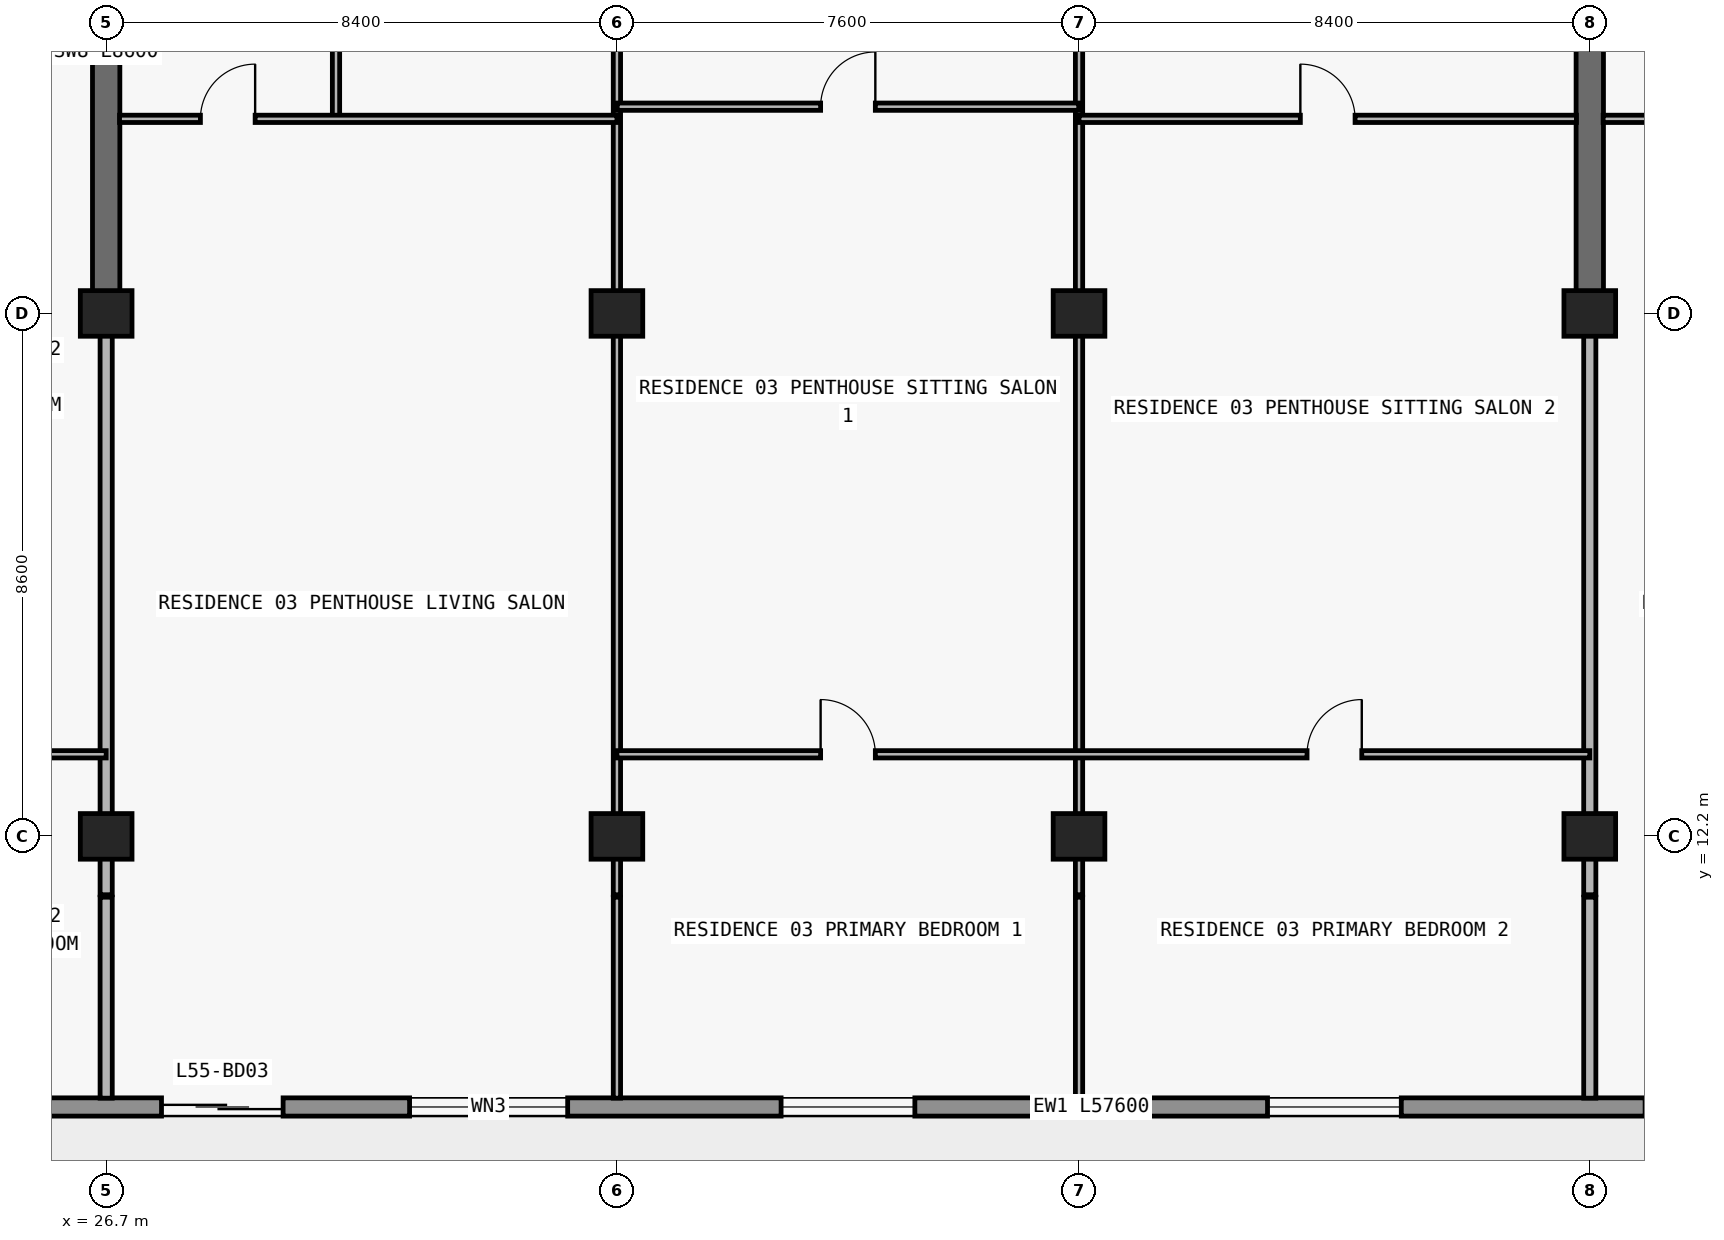
"""IFC4 building model, lengths in metres.
Left out: names, types, materials, properties, quantities, classifications, styles, units other than length and angle.
Written with IfcOpenShell. Run it as: python <this file> out.ifc"""

import sys

from ifc_helpers import new_model, si_unit, direction, frame, frame_2d, origin, origin_2d, place, context, subcontext, project, spatial, rectangle, extrude, element, fill, save


model = new_model("IFC4")
c1 = context("Model", 3, precision=1e-05, world=origin(), true_north=direction((0.0, 1.0)))
c2 = subcontext(c1, "Body", "Model", "MODEL_VIEW")
j1 = project(units=[si_unit("LENGTHUNIT", "METRE"), si_unit("PLANEANGLEUNIT", "RADIAN")], contexts=[c1])
p1 = place(None, origin())
s1 = spatial("IfcSite", under=j1, at=p1, CompositionType="ELEMENT")
p2 = place(p1, origin())
s2 = spatial("IfcBuilding", under=s1, at=p2, CompositionType="ELEMENT")
p3 = place(p2, frame((0.0, 0.0, 198.3)))
s3 = spatial("IfcBuildingStorey", under=s2, at=p3, CompositionType="ELEMENT", Elevation=198.3)
for number, where, z_axis, x_axis in (
    (1, (26.7, 12.2, 0.0), (0.0, 0.0, 1.0), (1.0, 0.0, 0.0)),
    (2, (35.1, 12.2, 0.0), (0.0, 0.0, 1.0), (1.0, 0.0, 0.0)),
    (3, (42.7, 12.2, 0.0), (0.0, 0.0, 1.0), (1.0, 0.0, 0.0)),
    (4, (51.1, 12.2, 0.0), (0.0, 0.0, 1.0), (1.0, 0.0, 0.0)),
    (5, (26.7, 20.8, 0.0), (0.0, 0.0, 1.0), (1.0, 0.0, 0.0)),
    (6, (35.1, 20.8, 0.0), (0.0, 0.0, 1.0), (1.0, 0.0, 0.0)),
    (7, (42.7, 20.8, 0.0), (0.0, 0.0, 1.0), (1.0, 0.0, 0.0)),
    (8, (51.1, 20.8, 0.0), (0.0, 0.0, 1.0), (1.0, 0.0, 0.0)),
):
    element("IfcColumn", number, at=place(p3, frame(where, z_axis=z_axis, x_axis=x_axis)), inside=s3, PredefinedType="COLUMN", context=c2, shape_type="SweptSolid", body=[
        extrude(rectangle(XDim=0.85, YDim=0.75, at=origin_2d()), origin(), (0.0, 0.0, 1.0), 3.05),
    ])
for number, where, z_axis, x_axis in (
    (9, (26.7, 20.8, 0.0), (0.0, 0.0, 1.0), (0.0, 1.0, 0.0)),
    (10, (51.1, 20.8, 0.0), (0.0, 0.0, 1.0), (0.0, 1.0, 0.0)),
):
    element("IfcWall", number, at=place(p3, frame(where, z_axis=z_axis, x_axis=x_axis)), inside=s3, PredefinedType="SHEAR", context=c2, shape_type="SweptSolid", body=[
        extrude(rectangle(XDim=8.6, YDim=0.45, at=frame_2d((4.3, 0.0))), origin(), (0.0, 0.0, 1.0), 3.05),
    ])
p4 = place(p3, frame((67.7, 7.75, 0.0), z_axis=(0.0, 0.0, 1.0), x_axis=(-1.0, 0.0, 0.0)))
e11 = element("IfcWall", 11, at=p4, inside=s3, PredefinedType="STANDARD", context=c2, shape_type="SweptSolid", body=[
    extrude(rectangle(XDim=57.6, YDim=0.3, at=frame_2d((28.8, 0.0))), origin(), (0.0, 0.0, 1.0), 3.05),
])
p5 = place(p4, frame((54.673, 0.0, 0.0)))
e12 = element("IfcOpeningElement", 12, at=p5, cuts=e11, PredefinedType="OPENING", context=c2, shape_type="SweptSolid", body=[
    extrude(rectangle(XDim=2.0, YDim=2.3, at=frame_2d((1.0, 1.15))), frame((0.0, 0.16, 0.0), z_axis=(0.0, -1.0, 0.0), x_axis=(1.0, 0.0, 0.0)), (0.0, 0.0, 1.0), 0.32),
])
p6 = place(p4, frame((50.473, 0.0, 0.85)))
e13 = element("IfcOpeningElement", 13, at=p6, cuts=e11, PredefinedType="OPENING", context=c2, shape_type="SweptSolid", body=[
    extrude(rectangle(XDim=2.2, YDim=1.55, at=frame_2d((1.1, 0.775))), frame((0.0, 0.16, 0.0), z_axis=(0.0, -1.0, 0.0), x_axis=(1.0, 0.0, 0.0)), (0.0, 0.0, 1.0), 0.32),
])
p7 = place(p4, frame((46.09, 0.0, 0.0)))
e14 = element("IfcOpeningElement", 14, at=p7, cuts=e11, PredefinedType="OPENING", context=c2, shape_type="SweptSolid", body=[
    extrude(rectangle(XDim=2.0, YDim=2.3, at=frame_2d((1.0, 1.15))), frame((0.0, 0.16, 0.0), z_axis=(0.0, -1.0, 0.0), x_axis=(1.0, 0.0, 0.0)), (0.0, 0.0, 1.0), 0.32),
])
p8 = place(p4, frame((41.99, 0.0, 0.85)))
e15 = element("IfcOpeningElement", 15, at=p8, cuts=e11, PredefinedType="OPENING", context=c2, shape_type="SweptSolid", body=[
    extrude(rectangle(XDim=1.8, YDim=1.55, at=frame_2d((0.9, 0.775))), frame((0.0, 0.16, 0.0), z_axis=(0.0, -1.0, 0.0), x_axis=(1.0, 0.0, 0.0)), (0.0, 0.0, 1.0), 0.32),
])
p9 = place(p4, frame((38.09, 0.0, 0.0)))
e16 = element("IfcOpeningElement", 16, at=p9, cuts=e11, PredefinedType="OPENING", context=c2, shape_type="SweptSolid", body=[
    extrude(rectangle(XDim=2.0, YDim=2.3, at=frame_2d((1.0, 1.15))), frame((0.0, 0.16, 0.0), z_axis=(0.0, -1.0, 0.0), x_axis=(1.0, 0.0, 0.0)), (0.0, 0.0, 1.0), 0.32),
])
p10 = place(p4, frame((33.41, 0.0, 0.65)))
e17 = element("IfcOpeningElement", 17, at=p10, cuts=e11, PredefinedType="OPENING", context=c2, shape_type="SweptSolid", body=[
    extrude(rectangle(XDim=2.6, YDim=1.85, at=frame_2d((1.3, 0.925))), frame((0.0, 0.16, 0.0), z_axis=(0.0, -1.0, 0.0), x_axis=(1.0, 0.0, 0.0)), (0.0, 0.0, 1.0), 0.32),
])
p11 = place(p4, frame((27.7, 0.0, 0.85)))
e18 = element("IfcOpeningElement", 18, at=p11, cuts=e11, PredefinedType="OPENING", context=c2, shape_type="SweptSolid", body=[
    extrude(rectangle(XDim=2.2, YDim=1.55, at=frame_2d((1.1, 0.775))), frame((0.0, 0.16, 0.0), z_axis=(0.0, -1.0, 0.0), x_axis=(1.0, 0.0, 0.0)), (0.0, 0.0, 1.0), 0.32),
])
p12 = place(p4, frame((19.7, 0.0, 0.85)))
e19 = element("IfcOpeningElement", 19, at=p12, cuts=e11, PredefinedType="OPENING", context=c2, shape_type="SweptSolid", body=[
    extrude(rectangle(XDim=2.2, YDim=1.55, at=frame_2d((1.1, 0.775))), frame((0.0, 0.16, 0.0), z_axis=(0.0, -1.0, 0.0), x_axis=(1.0, 0.0, 0.0)), (0.0, 0.0, 1.0), 0.32),
])
p13 = place(p4, frame((13.69, 0.0, 0.0)))
e20 = element("IfcOpeningElement", 20, at=p13, cuts=e11, PredefinedType="OPENING", context=c2, shape_type="SweptSolid", body=[
    extrude(rectangle(XDim=2.0, YDim=2.3, at=frame_2d((1.0, 1.15))), frame((0.0, 0.16, 0.0), z_axis=(0.0, -1.0, 0.0), x_axis=(1.0, 0.0, 0.0)), (0.0, 0.0, 1.0), 0.32),
])
p14 = place(p4, frame((9.01, 0.0, 0.65)))
e21 = element("IfcOpeningElement", 21, at=p14, cuts=e11, PredefinedType="OPENING", context=c2, shape_type="SweptSolid", body=[
    extrude(rectangle(XDim=2.6, YDim=1.85, at=frame_2d((1.3, 0.925))), frame((0.0, 0.16, 0.0), z_axis=(0.0, -1.0, 0.0), x_axis=(1.0, 0.0, 0.0)), (0.0, 0.0, 1.0), 0.32),
])
p15 = place(p4, frame((3.0, 0.0, 0.85)))
e22 = element("IfcOpeningElement", 22, at=p15, cuts=e11, PredefinedType="OPENING", context=c2, shape_type="SweptSolid", body=[
    extrude(rectangle(XDim=2.2, YDim=1.55, at=frame_2d((1.1, 0.775))), frame((0.0, 0.16, 0.0), z_axis=(0.0, -1.0, 0.0), x_axis=(1.0, 0.0, 0.0)), (0.0, 0.0, 1.0), 0.32),
])
p16 = place(p3, frame((26.7, 7.895, 0.0), z_axis=(0.0, 0.0, 1.0), x_axis=(0.0, 1.0, 0.0)))
e23 = element("IfcWall", 23, at=p16, inside=s3, PredefinedType="PARTITIONING", context=c2, shape_type="SweptSolid", body=[
    extrude(rectangle(XDim=3.305, YDim=0.2, at=frame_2d((1.652, 0.0))), origin(), (0.0, 0.0, 1.0), 3.05),
])
p17 = place(p3, frame((26.7, 11.24, 0.0), z_axis=(0.0, 0.0, 1.0), x_axis=(0.0, 1.0, 0.0)))
e24 = element("IfcWall", 24, at=p17, inside=s3, PredefinedType="PARTITIONING", context=c2, shape_type="SweptSolid", body=[
    extrude(rectangle(XDim=9.555, YDim=0.2, at=frame_2d((4.777, 0.0))), origin(), (0.0, 0.0, 1.0), 2.263),
])
p18 = place(p3, frame((30.48, 24.0, 0.0), z_axis=(0.0, 0.0, 1.0), x_axis=(0.0, 1.0, 0.0)))
e25 = element("IfcWall", 25, at=p18, inside=s3, PredefinedType="PARTITIONING", context=c2, shape_type="SweptSolid", body=[
    extrude(rectangle(XDim=4.8, YDim=0.12, at=frame_2d((2.4, 0.0))), origin(), (0.0, 0.0, 1.0), 3.05),
])
p19 = place(p18, frame((1.95, 0.0, 0.0)))
e26 = element("IfcOpeningElement", 26, at=p19, cuts=e25, PredefinedType="OPENING", context=c2, shape_type="SweptSolid", body=[
    extrude(rectangle(XDim=0.9, YDim=2.15, at=frame_2d((0.45, 1.075))), frame((0.0, 0.07, 0.0), z_axis=(0.0, -1.0, 0.0), x_axis=(1.0, 0.0, 0.0)), (0.0, 0.0, 1.0), 0.14),
])
p20 = place(p3, frame((35.1, 7.895, 0.0), z_axis=(0.0, 0.0, 1.0), x_axis=(0.0, 1.0, 0.0)))
e27 = element("IfcWall", 27, at=p20, inside=s3, PredefinedType="PARTITIONING", context=c2, shape_type="SweptSolid", body=[
    extrude(rectangle(XDim=3.305, YDim=0.12, at=frame_2d((1.652, 0.0))), origin(), (0.0, 0.0, 1.0), 3.05),
])
p21 = place(p3, frame((35.1, 11.24, 0.0), z_axis=(0.0, 0.0, 1.0), x_axis=(0.0, 1.0, 0.0)))
e28 = element("IfcWall", 28, at=p21, inside=s3, PredefinedType="PARTITIONING", context=c2, shape_type="SweptSolid", body=[
    extrude(rectangle(XDim=23.46, YDim=0.12, at=frame_2d((11.73, 0.0))), origin(), (0.0, 0.0, 1.0), 2.263),
])
p22 = place(p21, frame((14.71, 0.0, 0.0)))
e29 = element("IfcOpeningElement", 29, at=p22, cuts=e28, PredefinedType="OPENING", context=c2, shape_type="SweptSolid", body=[
    extrude(rectangle(XDim=0.9, YDim=2.15, at=frame_2d((0.45, 1.075))), frame((0.0, 0.07, 0.0), z_axis=(0.0, -1.0, 0.0), x_axis=(1.0, 0.0, 0.0)), (0.0, 0.0, 1.0), 0.14),
])
p23 = place(p3, frame((42.7, 7.895, 0.0), z_axis=(0.0, 0.0, 1.0), x_axis=(0.0, 1.0, 0.0)))
e30 = element("IfcWall", 30, at=p23, inside=s3, PredefinedType="PARTITIONING", context=c2, shape_type="SweptSolid", body=[
    extrude(rectangle(XDim=3.305, YDim=0.12, at=frame_2d((1.652, 0.0))), origin(), (0.0, 0.0, 1.0), 3.05),
])
p24 = place(p3, frame((42.7, 11.24, 0.0), z_axis=(0.0, 0.0, 1.0), x_axis=(0.0, 1.0, 0.0)))
e31 = element("IfcWall", 31, at=p24, inside=s3, PredefinedType="PARTITIONING", context=c2, shape_type="SweptSolid", body=[
    extrude(rectangle(XDim=23.46, YDim=0.12, at=frame_2d((11.73, 0.0))), origin(), (0.0, 0.0, 1.0), 2.263),
])
p25 = place(p24, frame((14.71, 0.0, 0.0)))
e32 = element("IfcOpeningElement", 32, at=p25, cuts=e31, PredefinedType="OPENING", context=c2, shape_type="SweptSolid", body=[
    extrude(rectangle(XDim=0.9, YDim=2.15, at=frame_2d((0.45, 1.075))), frame((0.0, 0.07, 0.0), z_axis=(0.0, -1.0, 0.0), x_axis=(1.0, 0.0, 0.0)), (0.0, 0.0, 1.0), 0.14),
])
p26 = place(p3, frame((51.1, 7.895, 0.0), z_axis=(0.0, 0.0, 1.0), x_axis=(0.0, 1.0, 0.0)))
e33 = element("IfcWall", 33, at=p26, inside=s3, PredefinedType="PARTITIONING", context=c2, shape_type="SweptSolid", body=[
    extrude(rectangle(XDim=3.305, YDim=0.2, at=frame_2d((1.652, 0.0))), origin(), (0.0, 0.0, 1.0), 3.05),
])
p27 = place(p3, frame((51.1, 11.24, 0.0), z_axis=(0.0, 0.0, 1.0), x_axis=(0.0, 1.0, 0.0)))
e34 = element("IfcWall", 34, at=p27, inside=s3, PredefinedType="PARTITIONING", context=c2, shape_type="SweptSolid", body=[
    extrude(rectangle(XDim=9.555, YDim=0.2, at=frame_2d((4.777, 0.0))), origin(), (0.0, 0.0, 1.0), 2.263),
])
p28 = place(p3, frame((22.92, 13.55, 0.0), z_axis=(0.0, 0.0, 1.0), x_axis=(1.0, 0.0, 0.0)))
e35 = element("IfcWall", 35, at=p28, inside=s3, PredefinedType="PARTITIONING", context=c2, shape_type="SweptSolid", body=[
    extrude(rectangle(XDim=3.78, YDim=0.12, at=frame_2d((1.89, 0.0))), origin(), (0.0, 0.0, 1.0), 3.05),
])
p29 = place(p28, frame((1.44, 0.0, 0.0)))
e36 = element("IfcOpeningElement", 36, at=p29, cuts=e35, PredefinedType="OPENING", context=c2, shape_type="SweptSolid", body=[
    extrude(rectangle(XDim=0.9, YDim=2.15, at=frame_2d((0.45, 1.075))), frame((0.0, 0.07, 0.0), z_axis=(0.0, -1.0, 0.0), x_axis=(1.0, 0.0, 0.0)), (0.0, 0.0, 1.0), 0.14),
])
p30 = place(p3, frame((35.1, 13.55, 0.0), z_axis=(0.0, 0.0, 1.0), x_axis=(1.0, 0.0, 0.0)))
e37 = element("IfcWall", 37, at=p30, inside=s3, PredefinedType="PARTITIONING", context=c2, shape_type="SweptSolid", body=[
    extrude(rectangle(XDim=16.0, YDim=0.12, at=frame_2d((8.0, 0.0))), origin(), (0.0, 0.0, 1.0), 3.05),
])
p31 = place(p30, frame((3.35, 0.0, 0.0)))
e38 = element("IfcOpeningElement", 38, at=p31, cuts=e37, PredefinedType="OPENING", context=c2, shape_type="SweptSolid", body=[
    extrude(rectangle(XDim=0.9, YDim=2.15, at=frame_2d((0.45, 1.075))), frame((0.0, 0.07, 0.0), z_axis=(0.0, -1.0, 0.0), x_axis=(1.0, 0.0, 0.0)), (0.0, 0.0, 1.0), 0.14),
])
p32 = place(p30, frame((11.35, 0.0, 0.0)))
e39 = element("IfcOpeningElement", 39, at=p32, cuts=e37, PredefinedType="OPENING", context=c2, shape_type="SweptSolid", body=[
    extrude(rectangle(XDim=0.9, YDim=2.15, at=frame_2d((0.45, 1.075))), frame((0.0, 0.07, 0.0), z_axis=(0.0, -1.0, 0.0), x_axis=(1.0, 0.0, 0.0)), (0.0, 0.0, 1.0), 0.14),
])
p33 = place(p3, frame((26.92, 24.0, 0.0), z_axis=(0.0, 0.0, 1.0), x_axis=(1.0, 0.0, 0.0)))
e40 = element("IfcWall", 40, at=p33, inside=s3, PredefinedType="PARTITIONING", context=c2, shape_type="SweptSolid", body=[
    extrude(rectangle(XDim=8.18, YDim=0.12, at=frame_2d((4.09, 0.0))), origin(), (0.0, 0.0, 1.0), 3.05),
])
p34 = place(p33, frame((1.33, 0.0, 0.0)))
e41 = element("IfcOpeningElement", 41, at=p34, cuts=e40, PredefinedType="OPENING", context=c2, shape_type="SweptSolid", body=[
    extrude(rectangle(XDim=0.9, YDim=2.15, at=frame_2d((0.45, 1.075))), frame((0.0, 0.07, 0.0), z_axis=(0.0, -1.0, 0.0), x_axis=(1.0, 0.0, 0.0)), (0.0, 0.0, 1.0), 0.14),
])
p35 = place(p3, frame((42.7, 24.0, 0.0), z_axis=(0.0, 0.0, 1.0), x_axis=(1.0, 0.0, 0.0)))
e42 = element("IfcWall", 42, at=p35, inside=s3, PredefinedType="PARTITIONING", context=c2, shape_type="SweptSolid", body=[
    extrude(rectangle(XDim=8.18, YDim=0.12, at=frame_2d((4.09, 0.0))), origin(), (0.0, 0.0, 1.0), 3.05),
])
p36 = place(p35, frame((3.64, 0.0, 0.0)))
e43 = element("IfcOpeningElement", 43, at=p36, cuts=e42, PredefinedType="OPENING", context=c2, shape_type="SweptSolid", body=[
    extrude(rectangle(XDim=0.9, YDim=2.15, at=frame_2d((0.45, 1.075))), frame((0.0, 0.07, 0.0), z_axis=(0.0, -1.0, 0.0), x_axis=(1.0, 0.0, 0.0)), (0.0, 0.0, 1.0), 0.14),
])
p37 = place(p3, frame((51.32, 24.0, 0.0), z_axis=(0.0, 0.0, 1.0), x_axis=(1.0, 0.0, 0.0)))
e44 = element("IfcWall", 44, at=p37, inside=s3, PredefinedType="PARTITIONING", context=c2, shape_type="SweptSolid", body=[
    extrude(rectangle(XDim=8.18, YDim=0.12, at=frame_2d((4.09, 0.0))), origin(), (0.0, 0.0, 1.0), 3.05),
])
p38 = place(p37, frame((1.204, 0.0, 0.0)))
e45 = element("IfcOpeningElement", 45, at=p38, cuts=e44, PredefinedType="OPENING", context=c2, shape_type="SweptSolid", body=[
    extrude(rectangle(XDim=0.9, YDim=2.15, at=frame_2d((0.45, 1.075))), frame((0.0, 0.07, 0.0), z_axis=(0.0, -1.0, 0.0), x_axis=(1.0, 0.0, 0.0)), (0.0, 0.0, 1.0), 0.14),
])
p39 = place(p3, frame((35.105, 24.2, 0.0), z_axis=(0.0, 0.0, 1.0), x_axis=(1.0, 0.0, 0.0)))
e46 = element("IfcWall", 46, at=p39, inside=s3, PredefinedType="PARTITIONING", context=c2, shape_type="SweptSolid", body=[
    extrude(rectangle(XDim=7.59, YDim=0.12, at=frame_2d((3.795, 0.0))), origin(), (0.0, 0.0, 1.0), 3.05),
])
p40 = place(p39, frame((3.345, 0.0, 0.0)))
e47 = element("IfcOpeningElement", 47, at=p40, cuts=e46, PredefinedType="OPENING", context=c2, shape_type="SweptSolid", body=[
    extrude(rectangle(XDim=0.9, YDim=2.15, at=frame_2d((0.45, 1.075))), frame((0.0, 0.07, 0.0), z_axis=(0.0, -1.0, 0.0), x_axis=(1.0, 0.0, 0.0)), (0.0, 0.0, 1.0), 0.14),
])
p41 = place(p3, frame((18.3, 25.03, 0.0), z_axis=(0.0, 0.0, 1.0), x_axis=(1.0, 0.0, 0.0)))
e48 = element("IfcWall", 48, at=p41, inside=s3, PredefinedType="PARTITIONING", context=c2, shape_type="SweptSolid", body=[
    extrude(rectangle(XDim=8.18, YDim=0.12, at=frame_2d((4.09, 0.0))), origin(), (0.0, 0.0, 1.0), 3.05),
])
p42 = place(p41, frame((1.693, 0.0, 0.0)))
e49 = element("IfcOpeningElement", 49, at=p42, cuts=e48, PredefinedType="OPENING", context=c2, shape_type="SweptSolid", body=[
    extrude(rectangle(XDim=0.9, YDim=2.15, at=frame_2d((0.45, 1.075))), frame((0.0, 0.07, 0.0), z_axis=(0.0, -1.0, 0.0), x_axis=(1.0, 0.0, 0.0)), (0.0, 0.0, 1.0), 0.14),
])
p43 = place(p41, frame((5.95, 0.0, 0.0)))
e50 = element("IfcOpeningElement", 50, at=p43, cuts=e48, PredefinedType="OPENING", context=c2, shape_type="SweptSolid", body=[
    extrude(rectangle(XDim=0.9, YDim=2.15, at=frame_2d((0.45, 1.075))), frame((0.0, 0.07, 0.0), z_axis=(0.0, -1.0, 0.0), x_axis=(1.0, 0.0, 0.0)), (0.0, 0.0, 1.0), 0.14),
])
p44 = place(p9, origin())
e51 = element("IfcDoor", 51, at=p44, inside=s3, OperationType="DOUBLE_DOOR_SLIDING", PredefinedType="DOOR", context=c2, shape_type="SweptSolid", body=[
    extrude(rectangle(XDim=2.0, YDim=2.3, at=frame_2d((1.0, 1.15))), frame((0.0, 0.025, 0.0), z_axis=(0.0, -1.0, 0.0), x_axis=(1.0, 0.0, 0.0)), (0.0, 0.0, 1.0), 0.05),
])
fill(e16, e51)
p45 = place(p10, origin())
e52 = element("IfcWindow", 52, at=p45, inside=s3, PartitioningType="SINGLE_PANEL", PredefinedType="WINDOW", context=c2, shape_type="SweptSolid", body=[
    extrude(rectangle(XDim=2.6, YDim=1.85, at=frame_2d((1.3, 0.925))), frame((0.0, 0.03, 0.0), z_axis=(0.0, -1.0, 0.0), x_axis=(1.0, 0.0, 0.0)), (0.0, 0.0, 1.0), 0.06),
])
fill(e17, e52)
p46 = place(p11, origin())
e53 = element("IfcWindow", 53, at=p46, inside=s3, PartitioningType="SINGLE_PANEL", PredefinedType="WINDOW", context=c2, shape_type="SweptSolid", body=[
    extrude(rectangle(XDim=2.2, YDim=1.55, at=frame_2d((1.1, 0.775))), frame((0.0, 0.03, 0.0), z_axis=(0.0, -1.0, 0.0), x_axis=(1.0, 0.0, 0.0)), (0.0, 0.0, 1.0), 0.06),
])
fill(e18, e53)
p47 = place(p12, origin())
e54 = element("IfcWindow", 54, at=p47, inside=s3, PartitioningType="SINGLE_PANEL", PredefinedType="WINDOW", context=c2, shape_type="SweptSolid", body=[
    extrude(rectangle(XDim=2.2, YDim=1.55, at=frame_2d((1.1, 0.775))), frame((0.0, 0.03, 0.0), z_axis=(0.0, -1.0, 0.0), x_axis=(1.0, 0.0, 0.0)), (0.0, 0.0, 1.0), 0.06),
])
fill(e19, e54)
p48 = place(p34, origin())
e55 = element("IfcDoor", 55, at=p48, inside=s3, OperationType="SINGLE_SWING_RIGHT", PredefinedType="DOOR", context=c2, shape_type="SweptSolid", body=[
    extrude(rectangle(XDim=0.9, YDim=2.15, at=frame_2d((0.45, 1.075))), frame((0.0, 0.025, 0.0), z_axis=(0.0, -1.0, 0.0), x_axis=(1.0, 0.0, 0.0)), (0.0, 0.0, 1.0), 0.05),
])
fill(e41, e55)
p49 = place(p40, origin())
e56 = element("IfcDoor", 56, at=p49, inside=s3, OperationType="SINGLE_SWING_RIGHT", PredefinedType="DOOR", context=c2, shape_type="SweptSolid", body=[
    extrude(rectangle(XDim=0.9, YDim=2.15, at=frame_2d((0.45, 1.075))), frame((0.0, 0.025, 0.0), z_axis=(0.0, -1.0, 0.0), x_axis=(1.0, 0.0, 0.0)), (0.0, 0.0, 1.0), 0.05),
])
fill(e47, e56)
p50 = place(p31, origin())
e57 = element("IfcDoor", 57, at=p50, inside=s3, OperationType="SINGLE_SWING_LEFT", PredefinedType="DOOR", context=c2, shape_type="SweptSolid", body=[
    extrude(rectangle(XDim=0.9, YDim=2.15, at=frame_2d((0.45, 1.075))), frame((0.0, 0.025, 0.0), z_axis=(0.0, -1.0, 0.0), x_axis=(1.0, 0.0, 0.0)), (0.0, 0.0, 1.0), 0.05),
])
fill(e38, e57)
p51 = place(p36, origin())
e58 = element("IfcDoor", 58, at=p51, inside=s3, OperationType="SINGLE_SWING_LEFT", PredefinedType="DOOR", context=c2, shape_type="SweptSolid", body=[
    extrude(rectangle(XDim=0.9, YDim=2.15, at=frame_2d((0.45, 1.075))), frame((0.0, 0.025, 0.0), z_axis=(0.0, -1.0, 0.0), x_axis=(1.0, 0.0, 0.0)), (0.0, 0.0, 1.0), 0.05),
])
fill(e43, e58)
p52 = place(p32, origin())
e59 = element("IfcDoor", 59, at=p52, inside=s3, OperationType="SINGLE_SWING_RIGHT", PredefinedType="DOOR", context=c2, shape_type="SweptSolid", body=[
    extrude(rectangle(XDim=0.9, YDim=2.15, at=frame_2d((0.45, 1.075))), frame((0.0, 0.025, 0.0), z_axis=(0.0, -1.0, 0.0), x_axis=(1.0, 0.0, 0.0)), (0.0, 0.0, 1.0), 0.05),
])
fill(e39, e59)
save(model, sys.argv[1])
